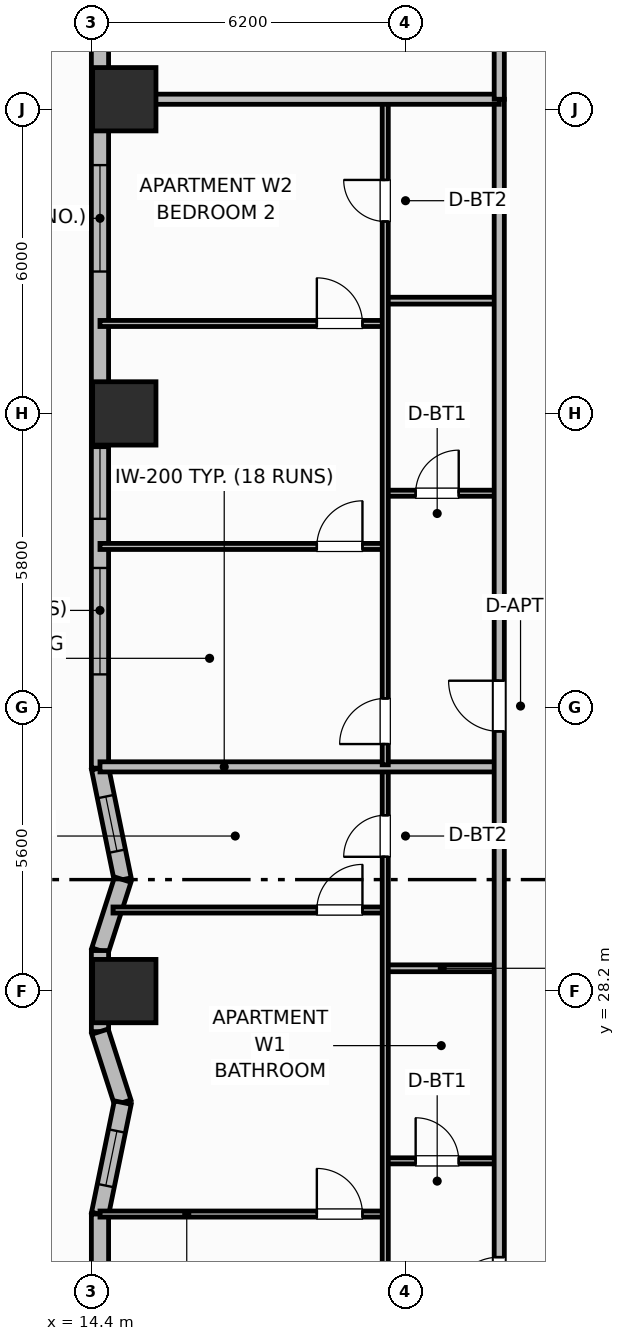
"""IFC4 building model, lengths in metres.
Left out: names, types, materials, properties, quantities, classifications, styles, units other than length and angle.
Written with IfcOpenShell. Run it as: python <this file> out.ifc"""

import sys

from ifc_helpers import new_model, si_unit, direction, frame, frame_2d, origin, origin_2d, place, context, subcontext, project, spatial, rectangle, extrude, element, fill, save


model = new_model("IFC4")
c1 = context("Model", 3, precision=1e-05, world=origin(), true_north=direction((0.0, 1.0)))
c2 = subcontext(c1, "Body", "Model", "MODEL_VIEW")
j1 = project(units=[si_unit("LENGTHUNIT", "METRE"), si_unit("PLANEANGLEUNIT", "RADIAN")], contexts=[c1])
p1 = place(None, origin())
s1 = spatial("IfcSite", under=j1, at=p1, CompositionType="ELEMENT")
p2 = place(p1, origin())
s2 = spatial("IfcBuilding", under=s1, at=p2, CompositionType="ELEMENT")
p3 = place(p2, frame((0.0, 0.0, 24.6)))
s3 = spatial("IfcBuildingStorey", under=s2, at=p3, CompositionType="ELEMENT", Elevation=24.6)
for number, where, z_axis, x_axis in (
    (1, (15.05, 28.2, 0.0), (0.0, 0.0, 1.0), (1.0, 0.0, 0.0)),
    (2, (15.05, 39.6, 0.0), (0.0, 0.0, 1.0), (1.0, 0.0, 0.0)),
    (3, (15.05, 45.8, 0.0), (0.0, 0.0, 1.0), (1.0, 0.0, 0.0)),
):
    element("IfcColumn", number, at=place(p3, frame(where, z_axis=z_axis, x_axis=x_axis)), inside=s3, PredefinedType="COLUMN", context=c2, shape_type="SweptSolid", body=[
        extrude(rectangle(XDim=1.25, YDim=1.25, at=origin_2d()), origin(), (0.0, 0.0, 1.0), 4.2),
    ])
p4 = place(p3, frame((14.57, 47.4, 0.0), z_axis=(0.0, 0.0, 1.0), x_axis=(0.0, -1.0, 0.0)))
e4 = element("IfcWall", 4, at=p4, inside=s3, PredefinedType="SOLIDWALL", context=c2, shape_type="SweptSolid", body=[
    extrude(rectangle(XDim=14.8, YDim=0.34, at=frame_2d((7.4, 0.0))), origin(), (0.0, 0.0, 1.0), 3.2),
])
p5 = place(p4, frame((2.9, 0.0, 0.8)))
e5 = element("IfcOpeningElement", 5, at=p5, cuts=e4, PredefinedType="OPENING", context=c2, shape_type="SweptSolid", body=[
    extrude(rectangle(XDim=2.1, YDim=1.9, at=frame_2d((1.05, 0.95))), frame((0.0, 0.18, 0.0), z_axis=(0.0, -1.0, 0.0), x_axis=(1.0, 0.0, 0.0)), (0.0, 0.0, 1.0), 0.36),
])
p6 = place(p4, frame((8.48, 0.0, 0.85)))
e6 = element("IfcOpeningElement", 6, at=p6, cuts=e4, PredefinedType="OPENING", context=c2, shape_type="SweptSolid", body=[
    extrude(rectangle(XDim=1.4, YDim=1.85, at=frame_2d((0.7, 0.925))), frame((0.0, 0.18, 0.0), z_axis=(0.0, -1.0, 0.0), x_axis=(1.0, 0.0, 0.0)), (0.0, 0.0, 1.0), 0.36),
])
p7 = place(p4, frame((10.85, 0.0, 0.8)))
e7 = element("IfcOpeningElement", 7, at=p7, cuts=e4, PredefinedType="OPENING", context=c2, shape_type="SweptSolid", body=[
    extrude(rectangle(XDim=2.1, YDim=1.9, at=frame_2d((1.05, 0.95))), frame((0.0, 0.18, 0.0), z_axis=(0.0, -1.0, 0.0), x_axis=(1.0, 0.0, 0.0)), (0.0, 0.0, 1.0), 0.36),
])
p8 = place(p3, frame((14.57, 32.6, 0.0), z_axis=(0.0, 0.0, 1.0), x_axis=(0.200358291506, -0.979722692921, 0.0)))
e8 = element("IfcWall", 8, at=p8, inside=s3, PredefinedType="SOLIDWALL", context=c2, shape_type="SweptSolid", body=[
    extrude(rectangle(XDim=2.246, YDim=0.34, at=frame_2d((1.123, 0.0))), origin(), (0.0, 0.0, 1.0), 3.2),
])
p9 = place(p8, frame((0.573, 0.0, 0.95)))
e9 = element("IfcOpeningElement", 9, at=p9, cuts=e8, PredefinedType="OPENING", context=c2, shape_type="SweptSolid", body=[
    extrude(rectangle(XDim=1.1, YDim=1.65, at=frame_2d((0.55, 0.825))), frame((0.0, 0.18, 0.0), z_axis=(0.0, -1.0, 0.0), x_axis=(1.0, 0.0, 0.0)), (0.0, 0.0, 1.0), 0.36),
])
p10 = place(p3, frame((15.02, 30.4, 0.0), z_axis=(0.0, 0.0, 1.0), x_axis=(-0.30599843145, -0.952032016242, 0.0)))
e10 = element("IfcWall", 10, at=p10, inside=s3, PredefinedType="SOLIDWALL", context=c2, shape_type="SweptSolid", body=[
    extrude(rectangle(XDim=1.47, YDim=0.34, at=frame_2d((0.735, 0.0))), origin(), (0.0, 0.0, 1.0), 3.2),
])
p11 = place(p3, frame((14.57, 29.0, 0.0), z_axis=(0.0, 0.0, 1.0), x_axis=(0.0, -1.0, 0.0)))
e11 = element("IfcWall", 11, at=p11, inside=s3, PredefinedType="SOLIDWALL", context=c2, shape_type="SweptSolid", body=[
    extrude(rectangle(XDim=1.6, YDim=0.34, at=frame_2d((0.8, 0.0))), origin(), (0.0, 0.0, 1.0), 3.2),
])
p12 = place(p3, frame((14.57, 27.4, 0.0), z_axis=(0.0, 0.0, 1.0), x_axis=(0.30599843145, -0.952032016242, 0.0)))
e12 = element("IfcWall", 12, at=p12, inside=s3, PredefinedType="SOLIDWALL", context=c2, shape_type="SweptSolid", body=[
    extrude(rectangle(XDim=1.47, YDim=0.34, at=frame_2d((0.735, 0.0))), origin(), (0.0, 0.0, 1.0), 3.2),
])
p13 = place(p3, frame((15.02, 26.0, 0.0), z_axis=(0.0, 0.0, 1.0), x_axis=(-0.200379633636, -0.979718328104, 0.0)))
e13 = element("IfcWall", 13, at=p13, inside=s3, PredefinedType="SOLIDWALL", context=c2, shape_type="SweptSolid", body=[
    extrude(rectangle(XDim=2.246, YDim=0.34, at=frame_2d((1.123, 0.0))), origin(), (0.0, 0.0, 1.0), 3.2),
])
p14 = place(p13, frame((0.573, 0.0, 0.95)))
e14 = element("IfcOpeningElement", 14, at=p14, cuts=e13, PredefinedType="OPENING", context=c2, shape_type="SweptSolid", body=[
    extrude(rectangle(XDim=1.1, YDim=1.65, at=frame_2d((0.55, 0.825))), frame((0.0, 0.18, 0.0), z_axis=(0.0, -1.0, 0.0), x_axis=(1.0, 0.0, 0.0)), (0.0, 0.0, 1.0), 0.36),
])
p15 = place(p3, frame((14.57, 23.8, 0.0), z_axis=(0.0, 0.0, 1.0), x_axis=(0.0, -1.0, 0.0)))
e15 = element("IfcWall", 15, at=p15, inside=s3, PredefinedType="SOLIDWALL", context=c2, shape_type="SweptSolid", body=[
    extrude(rectangle(XDim=14.8, YDim=0.34, at=frame_2d((7.4, 0.0))), origin(), (0.0, 0.0, 1.0), 3.2),
])
p16 = place(p15, frame((1.438, 0.0, 0.85)))
e16 = element("IfcOpeningElement", 16, at=p16, cuts=e15, PredefinedType="OPENING", context=c2, shape_type="SweptSolid", body=[
    extrude(rectangle(XDim=1.8, YDim=1.85, at=frame_2d((0.9, 0.925))), frame((0.0, 0.18, 0.0), z_axis=(0.0, -1.0, 0.0), x_axis=(1.0, 0.0, 0.0)), (0.0, 0.0, 1.0), 0.36),
])
p17 = place(p15, frame((4.6, 0.0, 0.0)))
e17 = element("IfcOpeningElement", 17, at=p17, cuts=e15, PredefinedType="OPENING", context=c2, shape_type="SweptSolid", body=[
    extrude(rectangle(XDim=1.5, YDim=2.1, at=frame_2d((0.75, 1.05))), frame((0.0, 0.18, 0.0), z_axis=(0.0, -1.0, 0.0), x_axis=(1.0, 0.0, 0.0)), (0.0, 0.0, 1.0), 0.36),
])
p18 = place(p15, frame((8.538, 0.0, 0.85)))
e18 = element("IfcOpeningElement", 18, at=p18, cuts=e15, PredefinedType="OPENING", context=c2, shape_type="SweptSolid", body=[
    extrude(rectangle(XDim=1.8, YDim=1.85, at=frame_2d((0.9, 0.925))), frame((0.0, 0.18, 0.0), z_axis=(0.0, -1.0, 0.0), x_axis=(1.0, 0.0, 0.0)), (0.0, 0.0, 1.0), 0.36),
])
p19 = place(p3, frame((20.2, 24.85, 0.0), z_axis=(0.0, 0.0, 1.0), x_axis=(1.0, 0.0, 0.0)))
e19 = element("IfcWall", 19, at=p19, inside=s3, PredefinedType="PARTITIONING", context=c2, shape_type="SweptSolid", body=[
    extrude(rectangle(XDim=2.25, YDim=0.12, at=frame_2d((1.125, 0.0))), origin(), (0.0, 0.0, 1.0), 3.03),
])
p20 = place(p19, frame((0.6, 0.0, 0.0)))
e20 = element("IfcOpeningElement", 20, at=p20, cuts=e19, PredefinedType="OPENING", context=c2, shape_type="SweptSolid", body=[
    extrude(rectangle(XDim=0.85, YDim=2.1, at=frame_2d((0.425, 1.05))), frame((0.0, 0.07, 0.0), z_axis=(0.0, -1.0, 0.0), x_axis=(1.0, 0.0, 0.0)), (0.0, 0.0, 1.0), 0.14),
])
p21 = place(p3, frame((20.2, 28.65, 0.0), z_axis=(0.0, 0.0, 1.0), x_axis=(1.0, 0.0, 0.0)))
e21 = element("IfcWall", 21, at=p21, inside=s3, PredefinedType="PARTITIONING", context=c2, shape_type="SweptSolid", body=[
    extrude(rectangle(XDim=2.25, YDim=0.135, at=frame_2d((1.125, 0.0))), origin(), (0.0, 0.0, 1.0), 3.03),
])
p22 = place(p3, frame((14.57, 23.8, 0.0), z_axis=(0.0, 0.0, 1.0), x_axis=(1.0, 0.0, 0.0)))
e22 = element("IfcWall", 22, at=p22, inside=s3, PredefinedType="PARTITIONING", context=c2, shape_type="SweptSolid", body=[
    extrude(rectangle(XDim=5.63, YDim=0.12, at=frame_2d((2.815, 0.0))), origin(), (0.0, 0.0, 1.0), 3.03),
])
p23 = place(p22, frame((4.28, 0.0, 0.0)))
e23 = element("IfcOpeningElement", 23, at=p23, cuts=e22, PredefinedType="OPENING", context=c2, shape_type="SweptSolid", body=[
    extrude(rectangle(XDim=0.9, YDim=2.1, at=frame_2d((0.45, 1.05))), frame((0.0, 0.07, 0.0), z_axis=(0.0, -1.0, 0.0), x_axis=(1.0, 0.0, 0.0)), (0.0, 0.0, 1.0), 0.14),
])
p24 = place(p3, frame((14.827, 29.8, 0.0), z_axis=(0.0, 0.0, 1.0), x_axis=(1.0, 0.0, 0.0)))
e24 = element("IfcWall", 24, at=p24, inside=s3, PredefinedType="PARTITIONING", context=c2, shape_type="SweptSolid", body=[
    extrude(rectangle(XDim=5.373, YDim=0.12, at=frame_2d((2.687, 0.0))), origin(), (0.0, 0.0, 1.0), 3.03),
])
p25 = place(p24, frame((4.023, 0.0, 0.0)))
e25 = element("IfcOpeningElement", 25, at=p25, cuts=e24, PredefinedType="OPENING", context=c2, shape_type="SweptSolid", body=[
    extrude(rectangle(XDim=0.9, YDim=2.1, at=frame_2d((0.45, 1.05))), frame((0.0, 0.07, 0.0), z_axis=(0.0, -1.0, 0.0), x_axis=(1.0, 0.0, 0.0)), (0.0, 0.0, 1.0), 0.14),
])
p26 = place(p3, frame((20.2, 19.49, 0.0), z_axis=(0.0, 0.0, 1.0), x_axis=(0.0, 1.0, 0.0)))
e26 = element("IfcWall", 26, at=p26, inside=s3, PredefinedType="PARTITIONING", context=c2, shape_type="SweptSolid", body=[
    extrude(rectangle(XDim=13.095, YDim=0.12, at=frame_2d((6.547, 0.0))), origin(), (0.0, 0.0, 1.0), 3.03),
])
p27 = place(p26, frame((0.41, 0.0, 0.0)))
e27 = element("IfcOpeningElement", 27, at=p27, cuts=e26, PredefinedType="OPENING", context=c2, shape_type="SweptSolid", body=[
    extrude(rectangle(XDim=0.9, YDim=2.1, at=frame_2d((0.45, 1.05))), frame((0.0, 0.07, 0.0), z_axis=(0.0, -1.0, 0.0), x_axis=(1.0, 0.0, 0.0)), (0.0, 0.0, 1.0), 0.14),
])
p28 = place(p26, frame((11.36, 0.0, 0.0)))
e28 = element("IfcOpeningElement", 28, at=p28, cuts=e26, PredefinedType="OPENING", context=c2, shape_type="SweptSolid", body=[
    extrude(rectangle(XDim=0.82, YDim=2.08, at=frame_2d((0.41, 1.04))), frame((0.0, 0.07, 0.0), z_axis=(0.0, -1.0, 0.0), x_axis=(1.0, 0.0, 0.0)), (0.0, 0.0, 1.0), 0.14),
])
p29 = place(p3, frame((14.57, 32.625, 0.0), z_axis=(0.0, 0.0, 1.0), x_axis=(1.0, 0.0, 0.0)))
e29 = element("IfcWall", 29, at=p29, inside=s3, PredefinedType="PARTITIONING", context=c2, shape_type="SweptSolid", body=[
    extrude(rectangle(XDim=7.88, YDim=0.2, at=frame_2d((3.94, 0.0))), origin(), (0.0, 0.0, 1.0), 3.03),
])
p30 = place(p3, frame((20.2, 38.025, 0.0), z_axis=(0.0, 0.0, 1.0), x_axis=(1.0, 0.0, 0.0)))
e30 = element("IfcWall", 30, at=p30, inside=s3, PredefinedType="PARTITIONING", context=c2, shape_type="SweptSolid", body=[
    extrude(rectangle(XDim=2.25, YDim=0.12, at=frame_2d((1.125, 0.0))), origin(), (0.0, 0.0, 1.0), 3.03),
])
p31 = place(p30, frame((0.6, 0.0, 0.0)))
e31 = element("IfcOpeningElement", 31, at=p31, cuts=e30, PredefinedType="OPENING", context=c2, shape_type="SweptSolid", body=[
    extrude(rectangle(XDim=0.85, YDim=2.1, at=frame_2d((0.425, 1.05))), frame((0.0, 0.07, 0.0), z_axis=(0.0, -1.0, 0.0), x_axis=(1.0, 0.0, 0.0)), (0.0, 0.0, 1.0), 0.14),
])
p32 = place(p3, frame((20.2, 41.825, 0.0), z_axis=(0.0, 0.0, 1.0), x_axis=(1.0, 0.0, 0.0)))
e32 = element("IfcWall", 32, at=p32, inside=s3, PredefinedType="PARTITIONING", context=c2, shape_type="SweptSolid", body=[
    extrude(rectangle(XDim=2.25, YDim=0.135, at=frame_2d((1.125, 0.0))), origin(), (0.0, 0.0, 1.0), 3.03),
])
p33 = place(p3, frame((14.57, 36.975, 0.0), z_axis=(0.0, 0.0, 1.0), x_axis=(1.0, 0.0, 0.0)))
e33 = element("IfcWall", 33, at=p33, inside=s3, PredefinedType="PARTITIONING", context=c2, shape_type="SweptSolid", body=[
    extrude(rectangle(XDim=5.63, YDim=0.12, at=frame_2d((2.815, 0.0))), origin(), (0.0, 0.0, 1.0), 3.03),
])
p34 = place(p33, frame((4.28, 0.0, 0.0)))
e34 = element("IfcOpeningElement", 34, at=p34, cuts=e33, PredefinedType="OPENING", context=c2, shape_type="SweptSolid", body=[
    extrude(rectangle(XDim=0.9, YDim=2.1, at=frame_2d((0.45, 1.05))), frame((0.0, 0.07, 0.0), z_axis=(0.0, -1.0, 0.0), x_axis=(1.0, 0.0, 0.0)), (0.0, 0.0, 1.0), 0.14),
])
p35 = place(p3, frame((14.57, 41.375, 0.0), z_axis=(0.0, 0.0, 1.0), x_axis=(1.0, 0.0, 0.0)))
e35 = element("IfcWall", 35, at=p35, inside=s3, PredefinedType="PARTITIONING", context=c2, shape_type="SweptSolid", body=[
    extrude(rectangle(XDim=5.63, YDim=0.12, at=frame_2d((2.815, 0.0))), origin(), (0.0, 0.0, 1.0), 3.03),
])
p36 = place(p35, frame((4.28, 0.0, 0.0)))
e36 = element("IfcOpeningElement", 36, at=p36, cuts=e35, PredefinedType="OPENING", context=c2, shape_type="SweptSolid", body=[
    extrude(rectangle(XDim=0.9, YDim=2.1, at=frame_2d((0.45, 1.05))), frame((0.0, 0.07, 0.0), z_axis=(0.0, -1.0, 0.0), x_axis=(1.0, 0.0, 0.0)), (0.0, 0.0, 1.0), 0.14),
])
p37 = place(p3, frame((20.2, 32.665, 0.0), z_axis=(0.0, 0.0, 1.0), x_axis=(0.0, 1.0, 0.0)))
e37 = element("IfcWall", 37, at=p37, inside=s3, PredefinedType="PARTITIONING", context=c2, shape_type="SweptSolid", body=[
    extrude(rectangle(XDim=13.095, YDim=0.12, at=frame_2d((6.547, 0.0))), origin(), (0.0, 0.0, 1.0), 3.03),
])
p38 = place(p37, frame((0.41, 0.0, 0.0)))
e38 = element("IfcOpeningElement", 38, at=p38, cuts=e37, PredefinedType="OPENING", context=c2, shape_type="SweptSolid", body=[
    extrude(rectangle(XDim=0.9, YDim=2.1, at=frame_2d((0.45, 1.05))), frame((0.0, 0.07, 0.0), z_axis=(0.0, -1.0, 0.0), x_axis=(1.0, 0.0, 0.0)), (0.0, 0.0, 1.0), 0.14),
])
p39 = place(p37, frame((10.722, 0.0, 0.0)))
e39 = element("IfcOpeningElement", 39, at=p39, cuts=e37, PredefinedType="OPENING", context=c2, shape_type="SweptSolid", body=[
    extrude(rectangle(XDim=0.82, YDim=2.08, at=frame_2d((0.41, 1.04))), frame((0.0, 0.07, 0.0), z_axis=(0.0, -1.0, 0.0), x_axis=(1.0, 0.0, 0.0)), (0.0, 0.0, 1.0), 0.14),
])
p40 = place(p3, frame((22.45, 19.45, 0.0), z_axis=(0.0, 0.0, 1.0), x_axis=(0.0, 1.0, 0.0)))
e40 = element("IfcWall", 40, at=p40, inside=s3, PredefinedType="PARTITIONING", context=c2, shape_type="SweptSolid", body=[
    extrude(rectangle(XDim=26.35, YDim=0.2, at=frame_2d((13.175, 0.0))), origin(), (0.0, 0.0, 1.0), 3.03),
])
p41 = place(p40, frame((2.5, 0.0, 0.0)))
e41 = element("IfcOpeningElement", 41, at=p41, cuts=e40, PredefinedType="OPENING", context=c2, shape_type="SweptSolid", body=[
    extrude(rectangle(XDim=1.0, YDim=2.15, at=frame_2d((0.5, 1.075))), frame((0.0, 0.11, 0.0), z_axis=(0.0, -1.0, 0.0), x_axis=(1.0, 0.0, 0.0)), (0.0, 0.0, 1.0), 0.22),
])
p42 = place(p40, frame((13.875, 0.0, 0.0)))
e42 = element("IfcOpeningElement", 42, at=p42, cuts=e40, PredefinedType="OPENING", context=c2, shape_type="SweptSolid", body=[
    extrude(rectangle(XDim=1.0, YDim=2.15, at=frame_2d((0.5, 1.075))), frame((0.0, 0.11, 0.0), z_axis=(0.0, -1.0, 0.0), x_axis=(1.0, 0.0, 0.0)), (0.0, 0.0, 1.0), 0.22),
])
p43 = place(p3, frame((14.99, 45.8, 0.0), z_axis=(0.0, 0.0, 1.0), x_axis=(1.0, 0.0, 0.0)))
e43 = element("IfcWall", 43, at=p43, inside=s3, PredefinedType="PARTITIONING", context=c2, shape_type="SweptSolid", body=[
    extrude(rectangle(XDim=7.46, YDim=0.2, at=frame_2d((3.73, 0.0))), origin(), (0.0, 0.0, 1.0), 3.03),
])
p44 = place(p3, frame((22.45, 45.8, 0.0), z_axis=(0.0, 0.0, 1.0), x_axis=(0.0, 1.0, 0.0)))
e44 = element("IfcWall", 44, at=p44, inside=s3, PredefinedType="PARTITIONING", context=c2, shape_type="SweptSolid", body=[
    extrude(rectangle(XDim=5.63, YDim=0.2, at=frame_2d((2.815, 0.0))), origin(), (0.0, 0.0, 1.0), 3.03),
])
p45 = place(p5, origin())
e45 = element("IfcWindow", 45, at=p45, inside=s3, PartitioningType="SINGLE_PANEL", PredefinedType="WINDOW", context=c2, shape_type="SweptSolid", body=[
    extrude(rectangle(XDim=2.1, YDim=1.9, at=frame_2d((1.05, 0.95))), frame((0.0, 0.03, 0.0), z_axis=(0.0, -1.0, 0.0), x_axis=(1.0, 0.0, 0.0)), (0.0, 0.0, 1.0), 0.06),
])
fill(e5, e45)
p46 = place(p6, origin())
e46 = element("IfcWindow", 46, at=p46, inside=s3, PartitioningType="SINGLE_PANEL", PredefinedType="WINDOW", context=c2, shape_type="SweptSolid", body=[
    extrude(rectangle(XDim=1.4, YDim=1.85, at=frame_2d((0.7, 0.925))), frame((0.0, 0.03, 0.0), z_axis=(0.0, -1.0, 0.0), x_axis=(1.0, 0.0, 0.0)), (0.0, 0.0, 1.0), 0.06),
])
fill(e6, e46)
p47 = place(p7, origin())
e47 = element("IfcWindow", 47, at=p47, inside=s3, PartitioningType="SINGLE_PANEL", PredefinedType="WINDOW", context=c2, shape_type="SweptSolid", body=[
    extrude(rectangle(XDim=2.1, YDim=1.9, at=frame_2d((1.05, 0.95))), frame((0.0, 0.03, 0.0), z_axis=(0.0, -1.0, 0.0), x_axis=(1.0, 0.0, 0.0)), (0.0, 0.0, 1.0), 0.06),
])
fill(e7, e47)
p48 = place(p9, origin())
e48 = element("IfcWindow", 48, at=p48, inside=s3, PartitioningType="SINGLE_PANEL", PredefinedType="WINDOW", context=c2, shape_type="SweptSolid", body=[
    extrude(rectangle(XDim=1.1, YDim=1.65, at=frame_2d((0.55, 0.825))), frame((0.0, 0.03, 0.0), z_axis=(0.0, -1.0, 0.0), x_axis=(1.0, 0.0, 0.0)), (0.0, 0.0, 1.0), 0.06),
])
fill(e9, e48)
p49 = place(p14, origin())
e49 = element("IfcWindow", 49, at=p49, inside=s3, PartitioningType="SINGLE_PANEL", PredefinedType="WINDOW", context=c2, shape_type="SweptSolid", body=[
    extrude(rectangle(XDim=1.1, YDim=1.65, at=frame_2d((0.55, 0.825))), frame((0.0, 0.03, 0.0), z_axis=(0.0, -1.0, 0.0), x_axis=(1.0, 0.0, 0.0)), (0.0, 0.0, 1.0), 0.06),
])
fill(e14, e49)
p50 = place(p20, origin())
e50 = element("IfcDoor", 50, at=p50, inside=s3, OperationType="SINGLE_SWING_LEFT", PredefinedType="DOOR", context=c2, shape_type="SweptSolid", body=[
    extrude(rectangle(XDim=0.85, YDim=2.1, at=frame_2d((0.425, 1.05))), frame((0.0, 0.025, 0.0), z_axis=(0.0, -1.0, 0.0), x_axis=(1.0, 0.0, 0.0)), (0.0, 0.0, 1.0), 0.05),
])
fill(e20, e50)
p51 = place(p23, origin())
e51 = element("IfcDoor", 51, at=p51, inside=s3, OperationType="SINGLE_SWING_LEFT", PredefinedType="DOOR", context=c2, shape_type="SweptSolid", body=[
    extrude(rectangle(XDim=0.9, YDim=2.1, at=frame_2d((0.45, 1.05))), frame((0.0, 0.025, 0.0), z_axis=(0.0, -1.0, 0.0), x_axis=(1.0, 0.0, 0.0)), (0.0, 0.0, 1.0), 0.05),
])
fill(e23, e51)
p52 = place(p25, origin())
e52 = element("IfcDoor", 52, at=p52, inside=s3, OperationType="SINGLE_SWING_RIGHT", PredefinedType="DOOR", context=c2, shape_type="SweptSolid", body=[
    extrude(rectangle(XDim=0.9, YDim=2.1, at=frame_2d((0.45, 1.05))), frame((0.0, 0.025, 0.0), z_axis=(0.0, -1.0, 0.0), x_axis=(1.0, 0.0, 0.0)), (0.0, 0.0, 1.0), 0.05),
])
fill(e25, e52)
p53 = place(p28, origin())
e53 = element("IfcDoor", 53, at=p53, inside=s3, OperationType="SINGLE_SWING_LEFT", PredefinedType="DOOR", context=c2, shape_type="SweptSolid", body=[
    extrude(rectangle(XDim=0.82, YDim=2.08, at=frame_2d((0.41, 1.04))), frame((0.0, 0.025, 0.0), z_axis=(0.0, -1.0, 0.0), x_axis=(1.0, 0.0, 0.0)), (0.0, 0.0, 1.0), 0.05),
])
fill(e28, e53)
p54 = place(p31, origin())
e54 = element("IfcDoor", 54, at=p54, inside=s3, OperationType="SINGLE_SWING_RIGHT", PredefinedType="DOOR", context=c2, shape_type="SweptSolid", body=[
    extrude(rectangle(XDim=0.85, YDim=2.1, at=frame_2d((0.425, 1.05))), frame((0.0, 0.025, 0.0), z_axis=(0.0, -1.0, 0.0), x_axis=(1.0, 0.0, 0.0)), (0.0, 0.0, 1.0), 0.05),
])
fill(e31, e54)
p55 = place(p34, origin())
e55 = element("IfcDoor", 55, at=p55, inside=s3, OperationType="SINGLE_SWING_RIGHT", PredefinedType="DOOR", context=c2, shape_type="SweptSolid", body=[
    extrude(rectangle(XDim=0.9, YDim=2.1, at=frame_2d((0.45, 1.05))), frame((0.0, 0.025, 0.0), z_axis=(0.0, -1.0, 0.0), x_axis=(1.0, 0.0, 0.0)), (0.0, 0.0, 1.0), 0.05),
])
fill(e34, e55)
p56 = place(p36, origin())
e56 = element("IfcDoor", 56, at=p56, inside=s3, OperationType="SINGLE_SWING_LEFT", PredefinedType="DOOR", context=c2, shape_type="SweptSolid", body=[
    extrude(rectangle(XDim=0.9, YDim=2.1, at=frame_2d((0.45, 1.05))), frame((0.0, 0.025, 0.0), z_axis=(0.0, -1.0, 0.0), x_axis=(1.0, 0.0, 0.0)), (0.0, 0.0, 1.0), 0.05),
])
fill(e36, e56)
p57 = place(p38, origin())
e57 = element("IfcDoor", 57, at=p57, inside=s3, OperationType="SINGLE_SWING_LEFT", PredefinedType="DOOR", context=c2, shape_type="SweptSolid", body=[
    extrude(rectangle(XDim=0.9, YDim=2.1, at=frame_2d((0.45, 1.05))), frame((0.0, 0.025, 0.0), z_axis=(0.0, -1.0, 0.0), x_axis=(1.0, 0.0, 0.0)), (0.0, 0.0, 1.0), 0.05),
])
fill(e38, e57)
p58 = place(p39, origin())
e58 = element("IfcDoor", 58, at=p58, inside=s3, OperationType="SINGLE_SWING_RIGHT", PredefinedType="DOOR", context=c2, shape_type="SweptSolid", body=[
    extrude(rectangle(XDim=0.82, YDim=2.08, at=frame_2d((0.41, 1.04))), frame((0.0, 0.025, 0.0), z_axis=(0.0, -1.0, 0.0), x_axis=(1.0, 0.0, 0.0)), (0.0, 0.0, 1.0), 0.05),
])
fill(e39, e58)
p59 = place(p41, origin())
e59 = element("IfcDoor", 59, at=p59, inside=s3, OperationType="SINGLE_SWING_LEFT", PredefinedType="DOOR", context=c2, shape_type="SweptSolid", body=[
    extrude(rectangle(XDim=1.0, YDim=2.15, at=frame_2d((0.5, 1.075))), frame((0.0, 0.025, 0.0), z_axis=(0.0, -1.0, 0.0), x_axis=(1.0, 0.0, 0.0)), (0.0, 0.0, 1.0), 0.05),
])
fill(e41, e59)
p60 = place(p42, origin())
e60 = element("IfcDoor", 60, at=p60, inside=s3, OperationType="SINGLE_SWING_RIGHT", PredefinedType="DOOR", context=c2, shape_type="SweptSolid", body=[
    extrude(rectangle(XDim=1.0, YDim=2.15, at=frame_2d((0.5, 1.075))), frame((0.0, 0.025, 0.0), z_axis=(0.0, -1.0, 0.0), x_axis=(1.0, 0.0, 0.0)), (0.0, 0.0, 1.0), 0.05),
])
fill(e42, e60)
save(model, sys.argv[1])
